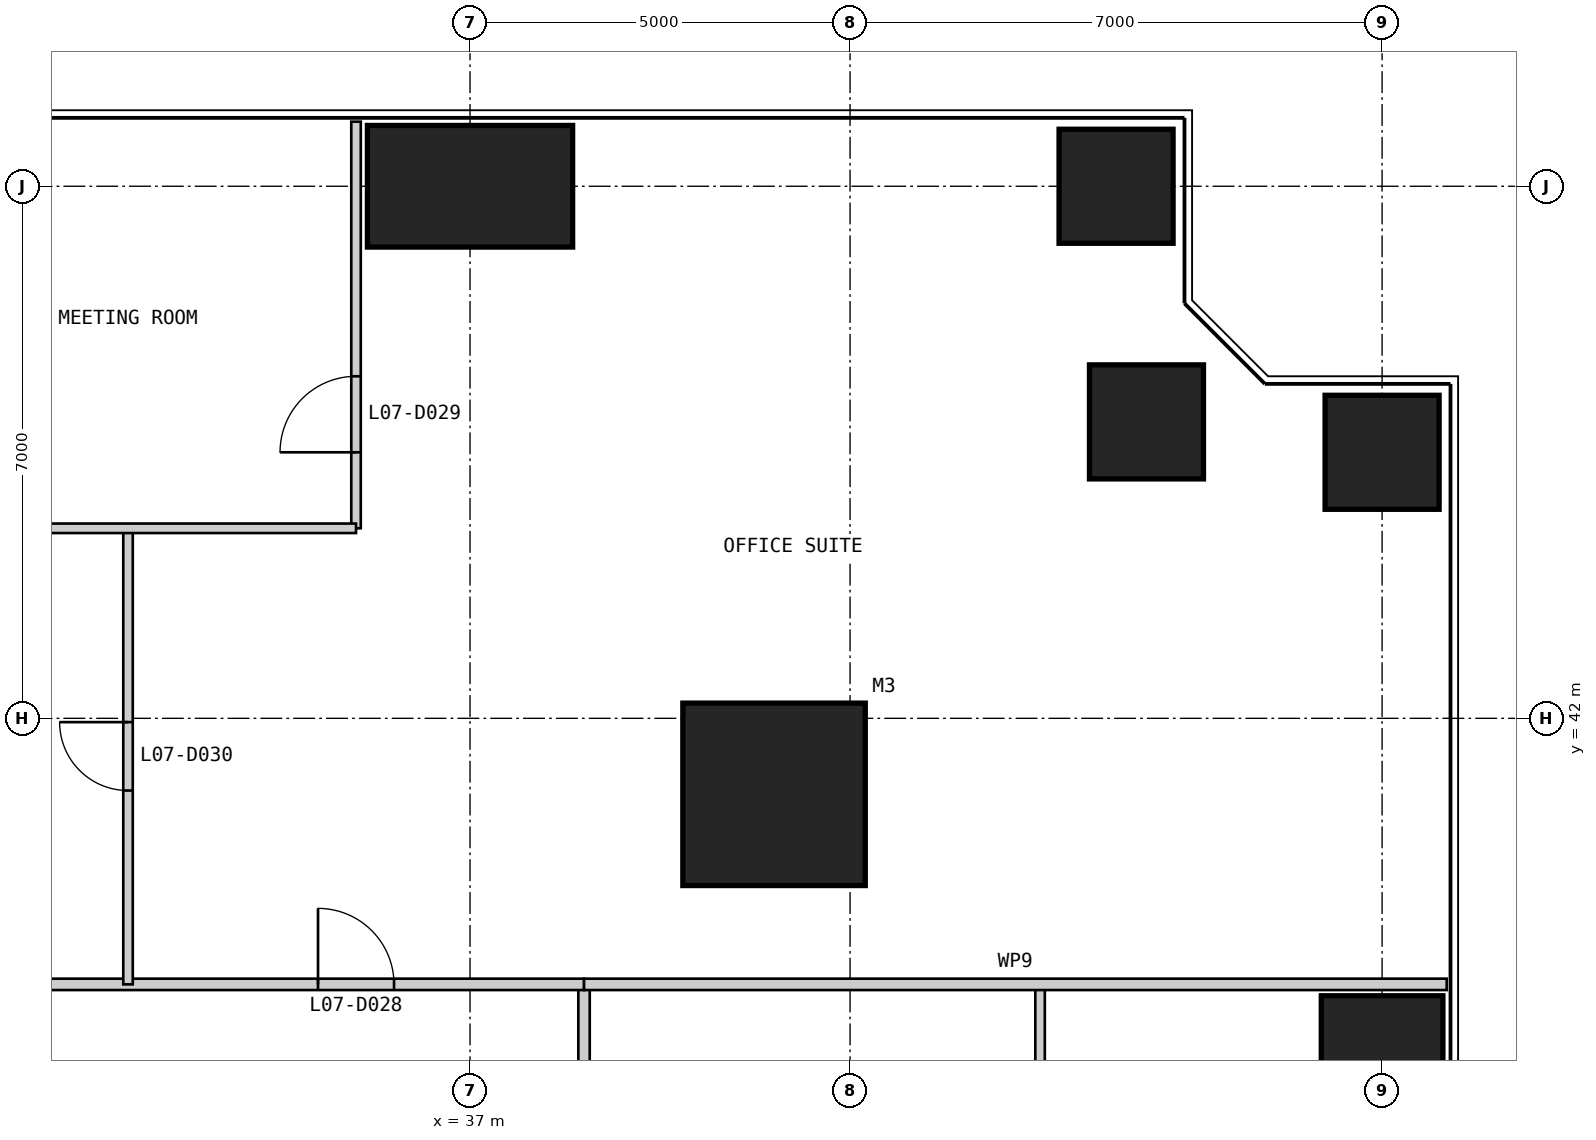
"""IFC4 building model, lengths in metres.
Left out: names, types, materials, properties, quantities, classifications, styles, units other than length and angle.
Written with IfcOpenShell. Run it as: python <this file> out.ifc"""

import sys

from ifc_helpers import new_model, si_unit, direction, frame, frame_2d, origin, origin_2d, place, context, subcontext, project, spatial, rectangle, extrude, element, fill, save


model = new_model("IFC4")
c1 = context("Model", 3, precision=1e-05, world=origin(), true_north=direction((0.0, 1.0)))
c2 = subcontext(c1, "Body", "Model", "MODEL_VIEW")
j1 = project(units=[si_unit("LENGTHUNIT", "METRE"), si_unit("PLANEANGLEUNIT", "RADIAN")], contexts=[c1])
p1 = place(None, origin())
s1 = spatial("IfcSite", under=j1, at=p1, CompositionType="ELEMENT")
p2 = place(p1, origin())
s2 = spatial("IfcBuilding", under=s1, at=p2, CompositionType="ELEMENT")
p3 = place(p2, frame((0.0, 0.0, 35.0)))
s3 = spatial("IfcBuildingStorey", under=s2, at=p3, CompositionType="ELEMENT", Elevation=35.0)
p4 = place(p3, frame((41.0, 41.0, 0.0), z_axis=(0.0, 0.0, 1.0), x_axis=(1.0, 0.0, 0.0)))
e1 = element("IfcColumn", 1, at=p4, inside=s3, PredefinedType="COLUMN", context=c2, shape_type="SweptSolid", body=[
    extrude(rectangle(XDim=2.4, YDim=2.4, at=origin_2d()), origin(), (0.0, 0.0, 1.0), 4.0),
])
p5 = place(p3, frame((49.0, 37.0, 0.0), z_axis=(0.0, 0.0, 1.0), x_axis=(1.0, 0.0, 0.0)))
e2 = element("IfcColumn", 2, at=p5, inside=s3, PredefinedType="COLUMN", context=c2, shape_type="SweptSolid", body=[
    extrude(rectangle(XDim=1.6, YDim=2.7, at=origin_2d()), origin(), (0.0, 0.0, 1.0), 4.0),
])
for number, where, z_axis, x_axis in (
    (3, (49.0, 45.5, 0.0), (0.0, 0.0, 1.0), (1.0, 0.0, 0.0)),
    (4, (45.9, 45.9, 0.0), (0.0, 0.0, 1.0), (1.0, 0.0, 0.0)),
    (5, (45.5, 49.0, 0.0), (0.0, 0.0, 1.0), (1.0, 0.0, 0.0)),
):
    element("IfcColumn", number, at=place(p3, frame(where, z_axis=z_axis, x_axis=x_axis)), inside=s3, PredefinedType="COLUMN", context=c2, shape_type="SweptSolid", body=[
        extrude(rectangle(XDim=1.5, YDim=1.5, at=origin_2d()), origin(), (0.0, 0.0, 1.0), 4.0),
    ])
p6 = place(p3, frame((37.0, 49.0, 0.0), z_axis=(0.0, 0.0, 1.0), x_axis=(1.0, 0.0, 0.0)))
e6 = element("IfcColumn", 6, at=p6, inside=s3, PredefinedType="COLUMN", context=c2, shape_type="SweptSolid", body=[
    extrude(rectangle(XDim=2.7, YDim=1.6, at=origin_2d()), origin(), (0.0, 0.0, 1.0), 4.0),
])
p7 = place(p3, frame((38.5, 11.5, 0.0), z_axis=(0.0, 0.0, 1.0), x_axis=(0.0, 1.0, 0.0)))
e7 = element("IfcWall", 7, at=p7, inside=s3, PredefinedType="PARTITIONING", context=c2, shape_type="SweptSolid", body=[
    extrude(rectangle(XDim=27.0, YDim=0.15, at=frame_2d((13.5, 0.0))), origin(), (0.0, 0.0, 1.0), 3.85),
])
p8 = place(p7, frame((11.5, 0.0, 0.0)))
e8 = element("IfcOpeningElement", 8, at=p8, cuts=e7, PredefinedType="OPENING", context=c2, shape_type="SweptSolid", body=[
    extrude(rectangle(XDim=1.0, YDim=2.2, at=frame_2d((0.5, 1.1))), frame((0.0, 0.085, 0.0), z_axis=(0.0, -1.0, 0.0), x_axis=(1.0, 0.0, 0.0)), (0.0, 0.0, 1.0), 0.17),
])
p9 = place(p3, frame((44.5, 14.5, 0.0), z_axis=(0.0, 0.0, 1.0), x_axis=(0.0, 1.0, 0.0)))
e9 = element("IfcWall", 9, at=p9, inside=s3, PredefinedType="PARTITIONING", context=c2, shape_type="SweptSolid", body=[
    extrude(rectangle(XDim=24.0, YDim=0.125, at=frame_2d((12.0, 0.0))), origin(), (0.0, 0.0, 1.0), 3.85),
])
p10 = place(p9, frame((10.05, 0.0, 0.0)))
e10 = element("IfcOpeningElement", 10, at=p10, cuts=e9, PredefinedType="OPENING", context=c2, shape_type="SweptSolid", body=[
    extrude(rectangle(XDim=0.9, YDim=2.2, at=frame_2d((0.45, 1.1))), frame((0.0, 0.073, 0.0), z_axis=(0.0, -1.0, 0.0), x_axis=(1.0, 0.0, 0.0)), (0.0, 0.0, 1.0), 0.145),
])
p11 = place(p9, frame((16.05, 0.0, 0.0)))
e11 = element("IfcOpeningElement", 11, at=p11, cuts=e9, PredefinedType="OPENING", context=c2, shape_type="SweptSolid", body=[
    extrude(rectangle(XDim=0.9, YDim=2.2, at=frame_2d((0.45, 1.1))), frame((0.0, 0.073, 0.0), z_axis=(0.0, -1.0, 0.0), x_axis=(1.0, 0.0, 0.0)), (0.0, 0.0, 1.0), 0.145),
])
p12 = place(p9, frame((19.05, 0.0, 0.0)))
e12 = element("IfcOpeningElement", 12, at=p12, cuts=e9, PredefinedType="OPENING", context=c2, shape_type="SweptSolid", body=[
    extrude(rectangle(XDim=0.9, YDim=2.2, at=frame_2d((0.45, 1.1))), frame((0.0, 0.073, 0.0), z_axis=(0.0, -1.0, 0.0), x_axis=(1.0, 0.0, 0.0)), (0.0, 0.0, 1.0), 0.145),
])
p13 = place(p3, frame((38.5, 38.5, 0.0), z_axis=(0.0, 0.0, 1.0), x_axis=(-1.0, 0.0, 0.0)))
e13 = element("IfcWall", 13, at=p13, inside=s3, PredefinedType="PARTITIONING", context=c2, shape_type="SweptSolid", body=[
    extrude(rectangle(XDim=27.0, YDim=0.15, at=frame_2d((13.5, 0.0))), origin(), (0.0, 0.0, 1.0), 3.85),
])
p14 = place(p13, frame((2.5, 0.0, 0.0)))
e14 = element("IfcOpeningElement", 14, at=p14, cuts=e13, PredefinedType="OPENING", context=c2, shape_type="SweptSolid", body=[
    extrude(rectangle(XDim=1.0, YDim=2.2, at=frame_2d((0.5, 1.1))), frame((0.0, 0.085, 0.0), z_axis=(0.0, -1.0, 0.0), x_axis=(1.0, 0.0, 0.0)), (0.0, 0.0, 1.0), 0.17),
])
p15 = place(p13, frame((13.0, 0.0, 0.0)))
e15 = element("IfcOpeningElement", 15, at=p15, cuts=e13, PredefinedType="OPENING", context=c2, shape_type="SweptSolid", body=[
    extrude(rectangle(XDim=1.0, YDim=2.2, at=frame_2d((0.5, 1.1))), frame((0.0, 0.085, 0.0), z_axis=(0.0, -1.0, 0.0), x_axis=(1.0, 0.0, 0.0)), (0.0, 0.0, 1.0), 0.17),
])
p16 = place(p13, frame((23.5, 0.0, 0.0)))
e16 = element("IfcOpeningElement", 16, at=p16, cuts=e13, PredefinedType="OPENING", context=c2, shape_type="SweptSolid", body=[
    extrude(rectangle(XDim=1.0, YDim=2.2, at=frame_2d((0.5, 1.1))), frame((0.0, 0.085, 0.0), z_axis=(0.0, -1.0, 0.0), x_axis=(1.0, 0.0, 0.0)), (0.0, 0.0, 1.0), 0.17),
])
p17 = place(p3, frame((49.85, 38.5, 0.0), z_axis=(0.0, 0.0, 1.0), x_axis=(-1.0, 0.0, 0.0)))
e17 = element("IfcWall", 17, at=p17, inside=s3, PredefinedType="PARTITIONING", context=c2, shape_type="SweptSolid", body=[
    extrude(rectangle(XDim=11.35, YDim=0.15, at=frame_2d((5.675, 0.0))), origin(), (0.0, 0.0, 1.0), 3.85),
])
p18 = place(p3, frame((35.5, 49.85, 0.0), z_axis=(0.0, 0.0, 1.0), x_axis=(0.0, -1.0, 0.0)))
e18 = element("IfcWall", 18, at=p18, inside=s3, PredefinedType="PARTITIONING", context=c2, shape_type="SweptSolid", body=[
    extrude(rectangle(XDim=5.35, YDim=0.125, at=frame_2d((2.675, 0.0))), origin(), (0.0, 0.0, 1.0), 3.85),
])
p19 = place(p18, frame((3.35, 0.0, 0.0)))
e19 = element("IfcOpeningElement", 19, at=p19, cuts=e18, PredefinedType="OPENING", context=c2, shape_type="SweptSolid", body=[
    extrude(rectangle(XDim=1.0, YDim=2.2, at=frame_2d((0.5, 1.1))), frame((0.0, 0.073, 0.0), z_axis=(0.0, -1.0, 0.0), x_axis=(1.0, 0.0, 0.0)), (0.0, 0.0, 1.0), 0.145),
])
p20 = place(p3, frame((32.5, 44.5, 0.0), z_axis=(0.0, 0.0, 1.0), x_axis=(0.0, -1.0, 0.0)))
e20 = element("IfcWall", 20, at=p20, inside=s3, PredefinedType="PARTITIONING", context=c2, shape_type="SweptSolid", body=[
    extrude(rectangle(XDim=6.0, YDim=0.125, at=frame_2d((3.0, 0.0))), origin(), (0.0, 0.0, 1.0), 3.85),
])
p21 = place(p20, frame((2.55, 0.0, 0.0)))
e21 = element("IfcOpeningElement", 21, at=p21, cuts=e20, PredefinedType="OPENING", context=c2, shape_type="SweptSolid", body=[
    extrude(rectangle(XDim=0.9, YDim=2.2, at=frame_2d((0.45, 1.1))), frame((0.0, 0.073, 0.0), z_axis=(0.0, -1.0, 0.0), x_axis=(1.0, 0.0, 0.0)), (0.0, 0.0, 1.0), 0.145),
])
p22 = place(p3, frame((35.5, 44.5, 0.0), z_axis=(0.0, 0.0, 1.0), x_axis=(-1.0, 0.0, 0.0)))
e22 = element("IfcWall", 22, at=p22, inside=s3, PredefinedType="PARTITIONING", context=c2, shape_type="SweptSolid", body=[
    extrude(rectangle(XDim=6.0, YDim=0.125, at=frame_2d((3.0, 0.0))), origin(), (0.0, 0.0, 1.0), 3.85),
])
p23 = place(p14, frame((1.0, 0.0, 0.0), z_axis=(0.0, 0.0, 1.0), x_axis=(-1.0, 0.0, 0.0)))
e23 = element("IfcDoor", 23, at=p23, inside=s3, OperationType="SINGLE_SWING_LEFT", PredefinedType="DOOR", context=c2, shape_type="SweptSolid", body=[
    extrude(rectangle(XDim=1.0, YDim=2.2, at=frame_2d((0.5, 1.1))), frame((0.0, 0.025, 0.0), z_axis=(0.0, -1.0, 0.0), x_axis=(1.0, 0.0, 0.0)), (0.0, 0.0, 1.0), 0.05),
])
fill(e14, e23)
p24 = place(p19, frame((1.0, 0.0, 0.0), z_axis=(0.0, 0.0, 1.0), x_axis=(-1.0, 0.0, 0.0)))
e24 = element("IfcDoor", 24, at=p24, inside=s3, OperationType="SINGLE_SWING_LEFT", PredefinedType="DOOR", context=c2, shape_type="SweptSolid", body=[
    extrude(rectangle(XDim=1.0, YDim=2.2, at=frame_2d((0.5, 1.1))), frame((0.0, 0.025, 0.0), z_axis=(0.0, -1.0, 0.0), x_axis=(1.0, 0.0, 0.0)), (0.0, 0.0, 1.0), 0.05),
])
fill(e19, e24)
p25 = place(p21, frame((0.9, 0.0, 0.0), z_axis=(0.0, 0.0, 1.0), x_axis=(-1.0, 0.0, 0.0)))
e25 = element("IfcDoor", 25, at=p25, inside=s3, OperationType="SINGLE_SWING_RIGHT", PredefinedType="DOOR", context=c2, shape_type="SweptSolid", body=[
    extrude(rectangle(XDim=0.9, YDim=2.2, at=frame_2d((0.45, 1.1))), frame((0.0, 0.025, 0.0), z_axis=(0.0, -1.0, 0.0), x_axis=(1.0, 0.0, 0.0)), (0.0, 0.0, 1.0), 0.05),
])
fill(e21, e25)
save(model, sys.argv[1])
